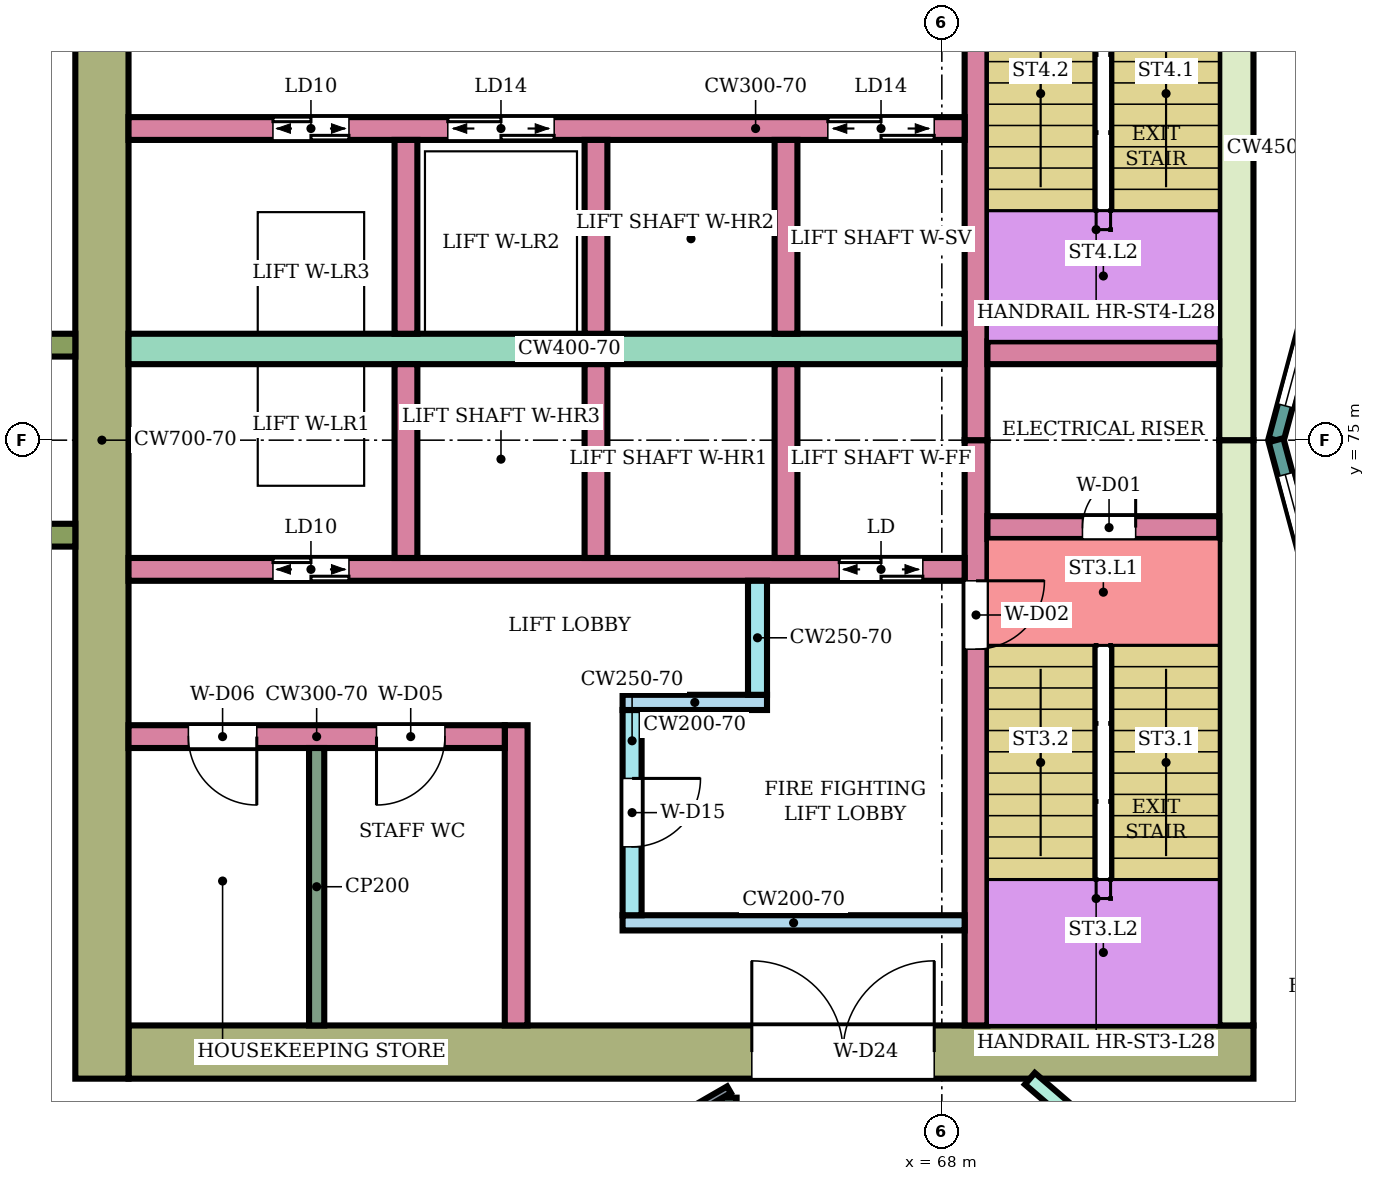
"""IFC4 building model, lengths in metres.
Left out: names, types, materials, properties, quantities, classifications, styles, units other than length and angle.
Written with IfcOpenShell. Run it as: python <this file> out.ifc"""

import sys

from ifc_helpers import new_model, si_unit, direction, frame, frame_2d, origin, place, context, subcontext, project, spatial, rectangle, extrude, element, fill, save


model = new_model("IFC4")
c1 = context("Model", 3, precision=1e-05, world=origin(), true_north=direction((0.0, 1.0)))
c2 = subcontext(c1, "Body", "Model", "MODEL_VIEW")
j1 = project(units=[si_unit("LENGTHUNIT", "METRE"), si_unit("PLANEANGLEUNIT", "RADIAN")], contexts=[c1])
p1 = place(None, origin())
s1 = spatial("IfcSite", under=j1, at=p1, CompositionType="ELEMENT")
p2 = place(p1, origin())
s2 = spatial("IfcBuilding", under=s1, at=p2, CompositionType="ELEMENT")
p3 = place(p2, frame((0.0, 0.0, 122.4)))
s3 = spatial("IfcBuildingStorey", under=s2, at=p3, CompositionType="ELEMENT", Elevation=122.4)
p4 = place(p3, frame((72.1, 66.95, 0.0), z_axis=(0.0, 0.0, 1.0), x_axis=(-1.0, 0.0, 0.0)))
e1 = element("IfcWall", 1, at=p4, inside=s3, PredefinedType="SHEAR", context=c2, shape_type="SweptSolid", body=[
    extrude(rectangle(XDim=14.8, YDim=0.7, at=frame_2d((7.4, 0.0))), origin(), (0.0, 0.0, 1.0), 3.58),
])
p5 = place(p4, frame((4.2, 0.0, 0.0)))
e2 = element("IfcOpeningElement", 2, at=p5, cuts=e1, PredefinedType="OPENING", context=c2, shape_type="SweptSolid", body=[
    extrude(rectangle(XDim=2.4, YDim=2.4, at=frame_2d((1.2, 1.2))), frame((0.0, 0.36, 0.0), z_axis=(0.0, -1.0, 0.0), x_axis=(1.0, 0.0, 0.0)), (0.0, 0.0, 1.0), 0.72),
])
for number, where, z_axis, x_axis in (
    (3, (71.875, 75.0, 0.0), (0.0, 0.0, 1.0), (0.0, -1.0, 0.0)),
    (4, (71.875, 82.7, 0.0), (0.0, 0.0, 1.0), (0.0, -1.0, 0.0)),
):
    element("IfcWall", number, at=place(p3, frame(where, z_axis=z_axis, x_axis=x_axis)), inside=s3, PredefinedType="SHEAR", context=c2, shape_type="SweptSolid", body=[
        extrude(rectangle(XDim=7.7, YDim=0.45, at=frame_2d((3.85, 0.0))), origin(), (0.0, 0.0, 1.0), 3.58),
    ])
p6 = place(p3, frame((56.95, 83.4, 0.0), z_axis=(0.0, 0.0, 1.0), x_axis=(0.0, -1.0, 0.0)))
e5 = element("IfcWall", 5, at=p6, inside=s3, PredefinedType="SHEAR", context=c2, shape_type="SweptSolid", body=[
    extrude(rectangle(XDim=16.8, YDim=0.7, at=frame_2d((8.4, 0.0))), origin(), (0.0, 0.0, 1.0), 3.58),
])
p7 = place(p3, frame((68.45, 75.0, 0.0), z_axis=(0.0, 0.0, 1.0), x_axis=(0.0, -1.0, 0.0)))
e6 = element("IfcWall", 6, at=p7, inside=s3, PredefinedType="SHEAR", context=c2, shape_type="SweptSolid", body=[
    extrude(rectangle(XDim=7.7, YDim=0.3, at=frame_2d((3.85, 0.0))), origin(), (0.0, 0.0, 1.0), 3.58),
])
p8 = place(p7, frame((1.85, 0.0, 0.0)))
e7 = element("IfcOpeningElement", 7, at=p8, cuts=e6, PredefinedType="OPENING", context=c2, shape_type="SweptSolid", body=[
    extrude(rectangle(XDim=0.9, YDim=2.1, at=frame_2d((0.45, 1.05))), frame((0.0, 0.16, 0.0), z_axis=(0.0, -1.0, 0.0), x_axis=(1.0, 0.0, 0.0)), (0.0, 0.0, 1.0), 0.32),
])
p9 = place(p3, frame((68.45, 82.7, 0.0), z_axis=(0.0, 0.0, 1.0), x_axis=(0.0, -1.0, 0.0)))
e8 = element("IfcWall", 8, at=p9, inside=s3, PredefinedType="SHEAR", context=c2, shape_type="SweptSolid", body=[
    extrude(rectangle(XDim=7.7, YDim=0.3, at=frame_2d((3.85, 0.0))), origin(), (0.0, 0.0, 1.0), 3.58),
])
p10 = place(p9, frame((0.35, 0.0, 0.0)))
e9 = element("IfcOpeningElement", 9, at=p10, cuts=e8, PredefinedType="OPENING", context=c2, shape_type="SweptSolid", body=[
    extrude(rectangle(XDim=0.9, YDim=2.1, at=frame_2d((0.45, 1.05))), frame((0.0, 0.16, 0.0), z_axis=(0.0, -1.0, 0.0), x_axis=(1.0, 0.0, 0.0)), (0.0, 0.0, 1.0), 0.32),
])
p11 = place(p3, frame((71.65, 73.85, 0.0), z_axis=(0.0, 0.0, 1.0), x_axis=(-1.0, 0.0, 0.0)))
e10 = element("IfcWall", 10, at=p11, inside=s3, PredefinedType="SHEAR", context=c2, shape_type="SweptSolid", body=[
    extrude(rectangle(XDim=3.05, YDim=0.3, at=frame_2d((1.525, 0.0))), origin(), (0.0, 0.0, 1.0), 3.58),
])
p12 = place(p11, frame((1.1, 0.0, 0.0)))
e11 = element("IfcOpeningElement", 11, at=p12, cuts=e10, PredefinedType="OPENING", context=c2, shape_type="SweptSolid", body=[
    extrude(rectangle(XDim=0.7, YDim=2.0, at=frame_2d((0.35, 1.0))), frame((0.0, 0.16, 0.0), z_axis=(0.0, -1.0, 0.0), x_axis=(1.0, 0.0, 0.0)), (0.0, 0.0, 1.0), 0.32),
])
p13 = place(p3, frame((71.65, 76.15, 0.0), z_axis=(0.0, 0.0, 1.0), x_axis=(-1.0, 0.0, 0.0)))
e12 = element("IfcWall", 12, at=p13, inside=s3, PredefinedType="SHEAR", context=c2, shape_type="SweptSolid", body=[
    extrude(rectangle(XDim=3.05, YDim=0.3, at=frame_2d((1.525, 0.0))), origin(), (0.0, 0.0, 1.0), 3.58),
])
p14 = place(p3, frame((68.3, 73.3, 0.0), z_axis=(0.0, 0.0, 1.0), x_axis=(-1.0, 0.0, 0.0)))
e13 = element("IfcWall", 13, at=p14, inside=s3, PredefinedType="SHEAR", context=c2, shape_type="SweptSolid", body=[
    extrude(rectangle(XDim=11.0, YDim=0.3, at=frame_2d((5.5, 0.0))), origin(), (0.0, 0.0, 1.0), 3.58),
])
p15 = place(p14, frame((0.55, 0.0, 0.0)))
e14 = element("IfcOpeningElement", 14, at=p15, cuts=e13, PredefinedType="OPENING", context=c2, shape_type="SweptSolid", body=[
    extrude(rectangle(XDim=1.1, YDim=2.1, at=frame_2d((0.55, 1.05))), frame((0.0, 0.16, 0.0), z_axis=(0.0, -1.0, 0.0), x_axis=(1.0, 0.0, 0.0)), (0.0, 0.0, 1.0), 0.32),
])
p16 = place(p14, frame((8.1, 0.0, 0.0)))
e15 = element("IfcOpeningElement", 15, at=p16, cuts=e13, PredefinedType="OPENING", context=c2, shape_type="SweptSolid", body=[
    extrude(rectangle(XDim=1.0, YDim=2.1, at=frame_2d((0.5, 1.05))), frame((0.0, 0.16, 0.0), z_axis=(0.0, -1.0, 0.0), x_axis=(1.0, 0.0, 0.0)), (0.0, 0.0, 1.0), 0.32),
])
p17 = place(p3, frame((68.3, 76.2, 0.0), z_axis=(0.0, 0.0, 1.0), x_axis=(-1.0, 0.0, 0.0)))
e16 = element("IfcWall", 16, at=p17, inside=s3, PredefinedType="SHEAR", context=c2, shape_type="SweptSolid", body=[
    extrude(rectangle(XDim=11.0, YDim=0.4, at=frame_2d((5.5, 0.0))), origin(), (0.0, 0.0, 1.0), 3.58),
])
p18 = place(p3, frame((68.3, 79.1, 0.0), z_axis=(0.0, 0.0, 1.0), x_axis=(-1.0, 0.0, 0.0)))
e17 = element("IfcWall", 17, at=p18, inside=s3, PredefinedType="SHEAR", context=c2, shape_type="SweptSolid", body=[
    extrude(rectangle(XDim=11.0, YDim=0.3, at=frame_2d((5.5, 0.0))), origin(), (0.0, 0.0, 1.0), 3.58),
])
p19 = place(p18, frame((0.4, 0.0, 0.0)))
e18 = element("IfcOpeningElement", 18, at=p19, cuts=e17, PredefinedType="OPENING", context=c2, shape_type="SweptSolid", body=[
    extrude(rectangle(XDim=1.4, YDim=2.1, at=frame_2d((0.7, 1.05))), frame((0.0, 0.16, 0.0), z_axis=(0.0, -1.0, 0.0), x_axis=(1.0, 0.0, 0.0)), (0.0, 0.0, 1.0), 0.32),
])
p20 = place(p18, frame((5.4, 0.0, 0.0)))
e19 = element("IfcOpeningElement", 19, at=p20, cuts=e17, PredefinedType="OPENING", context=c2, shape_type="SweptSolid", body=[
    extrude(rectangle(XDim=1.4, YDim=2.1, at=frame_2d((0.7, 1.05))), frame((0.0, 0.16, 0.0), z_axis=(0.0, -1.0, 0.0), x_axis=(1.0, 0.0, 0.0)), (0.0, 0.0, 1.0), 0.32),
])
p21 = place(p18, frame((8.1, 0.0, 0.0)))
e20 = element("IfcOpeningElement", 20, at=p21, cuts=e17, PredefinedType="OPENING", context=c2, shape_type="SweptSolid", body=[
    extrude(rectangle(XDim=1.0, YDim=2.1, at=frame_2d((0.5, 1.05))), frame((0.0, 0.16, 0.0), z_axis=(0.0, -1.0, 0.0), x_axis=(1.0, 0.0, 0.0)), (0.0, 0.0, 1.0), 0.32),
])
for number, where, z_axis, x_axis in (
    (21, (65.95, 76.0, 0.0), (0.0, 0.0, 1.0), (0.0, -1.0, 0.0)),
    (22, (63.45, 76.0, 0.0), (0.0, 0.0, 1.0), (0.0, -1.0, 0.0)),
    (23, (60.95, 76.0, 0.0), (0.0, 0.0, 1.0), (0.0, -1.0, 0.0)),
    (24, (65.95, 78.95, 0.0), (0.0, 0.0, 1.0), (0.0, -1.0, 0.0)),
    (25, (63.45, 78.95, 0.0), (0.0, 0.0, 1.0), (0.0, -1.0, 0.0)),
    (26, (60.95, 78.95, 0.0), (0.0, 0.0, 1.0), (0.0, -1.0, 0.0)),
):
    element("IfcWall", number, at=place(p3, frame(where, z_axis=z_axis, x_axis=x_axis)), inside=s3, PredefinedType="SHEAR", context=c2, shape_type="SweptSolid", body=[
        extrude(rectangle(XDim=2.55, YDim=0.3, at=frame_2d((1.275, 0.0))), origin(), (0.0, 0.0, 1.0), 3.58),
    ])
p22 = place(p3, frame((68.3, 68.65, 0.0), z_axis=(0.0, 0.0, 1.0), x_axis=(-1.0, 0.0, 0.0)))
e27 = element("IfcWall", 27, at=p22, inside=s3, PredefinedType="SHEAR", context=c2, shape_type="SweptSolid", body=[
    extrude(rectangle(XDim=4.5, YDim=0.2, at=frame_2d((2.25, 0.0))), origin(), (0.0, 0.0, 1.0), 3.58),
])
p23 = place(p3, frame((63.925, 71.45, 0.0), z_axis=(0.0, 0.0, 1.0), x_axis=(0.0, -1.0, 0.0)))
e28 = element("IfcWall", 28, at=p23, inside=s3, PredefinedType="SHEAR", context=c2, shape_type="SweptSolid", body=[
    extrude(rectangle(XDim=2.7, YDim=0.25, at=frame_2d((1.35, 0.0))), origin(), (0.0, 0.0, 1.0), 3.58),
])
p24 = place(p23, frame((0.9, 0.0, 0.0)))
e29 = element("IfcOpeningElement", 29, at=p24, cuts=e28, PredefinedType="OPENING", context=c2, shape_type="SweptSolid", body=[
    extrude(rectangle(XDim=0.9, YDim=2.1, at=frame_2d((0.45, 1.05))), frame((0.0, 0.135, 0.0), z_axis=(0.0, -1.0, 0.0), x_axis=(1.0, 0.0, 0.0)), (0.0, 0.0, 1.0), 0.27),
])
p25 = place(p3, frame((65.7, 71.55, 0.0), z_axis=(0.0, 0.0, 1.0), x_axis=(-1.0, 0.0, 0.0)))
e30 = element("IfcWall", 30, at=p25, inside=s3, PredefinedType="SHEAR", context=c2, shape_type="SweptSolid", body=[
    extrude(rectangle(XDim=1.9, YDim=0.2, at=frame_2d((0.95, 0.0))), origin(), (0.0, 0.0, 1.0), 3.58),
])
p26 = place(p3, frame((65.575, 73.15, 0.0), z_axis=(0.0, 0.0, 1.0), x_axis=(0.0, -1.0, 0.0)))
e31 = element("IfcWall", 31, at=p26, inside=s3, PredefinedType="SHEAR", context=c2, shape_type="SweptSolid", body=[
    extrude(rectangle(XDim=1.5, YDim=0.25, at=frame_2d((0.75, 0.0))), origin(), (0.0, 0.0, 1.0), 3.58),
])
p27 = place(p3, frame((62.4, 71.25, 0.0), z_axis=(0.0, 0.0, 1.0), x_axis=(0.0, -1.0, 0.0)))
e32 = element("IfcWall", 32, at=p27, inside=s3, PredefinedType="SHEAR", context=c2, shape_type="SweptSolid", body=[
    extrude(rectangle(XDim=3.95, YDim=0.3, at=frame_2d((1.975, 0.0))), origin(), (0.0, 0.0, 1.0), 3.58),
])
p28 = place(p3, frame((62.25, 71.1, 0.0), z_axis=(0.0, 0.0, 1.0), x_axis=(-1.0, 0.0, 0.0)))
e33 = element("IfcWall", 33, at=p28, inside=s3, PredefinedType="SHEAR", context=c2, shape_type="SweptSolid", body=[
    extrude(rectangle(XDim=4.95, YDim=0.3, at=frame_2d((2.475, 0.0))), origin(), (0.0, 0.0, 1.0), 3.58),
])
p29 = place(p28, frame((0.788, 0.0, 0.0)))
e34 = element("IfcOpeningElement", 34, at=p29, cuts=e33, PredefinedType="OPENING", context=c2, shape_type="SweptSolid", body=[
    extrude(rectangle(XDim=0.9, YDim=2.1, at=frame_2d((0.45, 1.05))), frame((0.0, 0.16, 0.0), z_axis=(0.0, -1.0, 0.0), x_axis=(1.0, 0.0, 0.0)), (0.0, 0.0, 1.0), 0.32),
])
p30 = place(p28, frame((3.262, 0.0, 0.0)))
e35 = element("IfcOpeningElement", 35, at=p30, cuts=e33, PredefinedType="OPENING", context=c2, shape_type="SweptSolid", body=[
    extrude(rectangle(XDim=0.9, YDim=2.1, at=frame_2d((0.45, 1.05))), frame((0.0, 0.16, 0.0), z_axis=(0.0, -1.0, 0.0), x_axis=(1.0, 0.0, 0.0)), (0.0, 0.0, 1.0), 0.32),
])
for number, where, z_axis, x_axis in (
    (36, (56.6, 76.25, 0.0), (0.0, 0.0, 1.0), (-1.0, 0.0, 0.0)),
    (37, (56.6, 73.75, 0.0), (0.0, 0.0, 1.0), (-1.0, 0.0, 0.0)),
):
    element("IfcWall", number, at=place(p3, frame(where, z_axis=z_axis, x_axis=x_axis)), inside=s3, PredefinedType="NOTDEFINED", context=c2, shape_type="SweptSolid", body=[
        extrude(rectangle(XDim=2.416, YDim=0.3, at=frame_2d((1.208, 0.0))), origin(), (0.0, 0.0, 1.0), 3.9),
    ])
p31 = place(p3, frame((73.415, 78.802, 0.0), z_axis=(0.0, 0.0, 1.0), x_axis=(-0.258789828301, -0.965933654434, 0.0)))
e38 = element("IfcWall", 38, at=p31, inside=s3, PredefinedType="NOTDEFINED", context=c2, shape_type="SweptSolid", body=[
    extrude(rectangle(XDim=3.936, YDim=0.2, at=frame_2d((1.968, 0.0))), origin(), (0.0, 0.0, 1.0), 3.9),
])
p32 = place(p31, frame((0.468, 0.0, 0.9)))
e39 = element("IfcOpeningElement", 39, at=p32, cuts=e38, PredefinedType="OPENING", context=c2, shape_type="SweptSolid", body=[
    extrude(rectangle(XDim=3.0, YDim=2.3, at=frame_2d((1.5, 1.15))), frame((0.0, 0.11, 0.0), z_axis=(0.0, -1.0, 0.0), x_axis=(1.0, 0.0, 0.0)), (0.0, 0.0, 1.0), 0.22),
])
p33 = place(p3, frame((72.396, 75.0, 0.0), z_axis=(0.0, 0.0, 1.0), x_axis=(0.258789828301, -0.965933654434, 0.0)))
e40 = element("IfcWall", 40, at=p33, inside=s3, PredefinedType="NOTDEFINED", context=c2, shape_type="SweptSolid", body=[
    extrude(rectangle(XDim=3.936, YDim=0.2, at=frame_2d((1.968, 0.0))), origin(), (0.0, 0.0, 1.0), 3.9),
])
p34 = place(p33, frame((0.468, 0.0, 0.9)))
e41 = element("IfcOpeningElement", 41, at=p34, cuts=e40, PredefinedType="OPENING", context=c2, shape_type="SweptSolid", body=[
    extrude(rectangle(XDim=3.0, YDim=2.3, at=frame_2d((1.5, 1.15))), frame((0.0, 0.11, 0.0), z_axis=(0.0, -1.0, 0.0), x_axis=(1.0, 0.0, 0.0)), (0.0, 0.0, 1.0), 0.22),
])
p35 = place(p3, frame((65.2, 65.2, 0.0), z_axis=(0.0, 0.0, 1.0), x_axis=(0.0, 1.0, 0.0)))
e42 = element("IfcWall", 42, at=p35, inside=s3, PredefinedType="PARTITIONING", context=c2, shape_type="SweptSolid", body=[
    extrude(rectangle(XDim=1.15, YDim=0.2, at=frame_2d((0.575, 0.0))), origin(), (0.0, 0.0, 1.0), 3.45),
])
p36 = place(p3, frame((69.158, 66.6, 0.0), z_axis=(0.0, 0.0, 1.0), x_axis=(0.758063092745, -0.652181222835, 0.0)))
e43 = element("IfcWall", 43, at=p36, inside=s3, PredefinedType="PARTITIONING", context=c2, shape_type="SweptSolid", body=[
    extrude(rectangle(XDim=5.16, YDim=0.2, at=frame_2d((2.58, 0.0))), origin(), (0.0, 0.0, 1.0), 3.45),
])
p37 = place(p36, frame((2.165, 0.0, 0.0)))
e44 = element("IfcOpeningElement", 44, at=p37, cuts=e43, PredefinedType="OPENING", context=c2, shape_type="SweptSolid", body=[
    extrude(rectangle(XDim=0.9, YDim=2.1, at=frame_2d((0.45, 1.05))), frame((0.0, 0.11, 0.0), z_axis=(0.0, -1.0, 0.0), x_axis=(1.0, 0.0, 0.0)), (0.0, 0.0, 1.0), 0.22),
])
p38 = place(p3, frame((57.659, 62.101, 0.0), z_axis=(0.0, 0.0, 1.0), x_axis=(0.86602264145, 0.500004784474, 0.0)))
e45 = element("IfcWall", 45, at=p38, inside=s3, PredefinedType="PARTITIONING", context=c2, shape_type="SweptSolid", body=[
    extrude(rectangle(XDim=8.708, YDim=0.1, at=frame_2d((4.354, 0.0))), origin(), (0.0, 0.0, 1.0), 3.45),
])
p39 = place(p38, frame((3.929, 0.0, 0.0)))
e46 = element("IfcOpeningElement", 46, at=p39, cuts=e45, PredefinedType="OPENING", context=c2, shape_type="SweptSolid", body=[
    extrude(rectangle(XDim=0.9, YDim=2.1, at=frame_2d((0.45, 1.05))), frame((0.0, 0.06, 0.0), z_axis=(0.0, -1.0, 0.0), x_axis=(1.0, 0.0, 0.0)), (0.0, 0.0, 1.0), 0.12),
])
p40 = place(p3, frame((59.775, 70.95, 0.0), z_axis=(0.0, 0.0, 1.0), x_axis=(0.0, -1.0, 0.0)))
e47 = element("IfcWall", 47, at=p40, inside=s3, PredefinedType="PARTITIONING", context=c2, shape_type="SweptSolid", body=[
    extrude(rectangle(XDim=3.65, YDim=0.2, at=frame_2d((1.825, 0.0))), origin(), (0.0, 0.0, 1.0), 3.58),
])
p41 = place(p32, origin())
e48 = element("IfcWindow", 48, at=p41, inside=s3, PartitioningType="SINGLE_PANEL", PredefinedType="WINDOW", context=c2, shape_type="SweptSolid", body=[
    extrude(rectangle(XDim=3.0, YDim=2.3, at=frame_2d((1.5, 1.15))), frame((0.0, 0.03, 0.0), z_axis=(0.0, -1.0, 0.0), x_axis=(1.0, 0.0, 0.0)), (0.0, 0.0, 1.0), 0.06),
])
fill(e39, e48)
p42 = place(p34, origin())
e49 = element("IfcWindow", 49, at=p42, inside=s3, PartitioningType="SINGLE_PANEL", PredefinedType="WINDOW", context=c2, shape_type="SweptSolid", body=[
    extrude(rectangle(XDim=3.0, YDim=2.3, at=frame_2d((1.5, 1.15))), frame((0.0, 0.03, 0.0), z_axis=(0.0, -1.0, 0.0), x_axis=(1.0, 0.0, 0.0)), (0.0, 0.0, 1.0), 0.06),
])
fill(e41, e49)
p43 = place(p12, frame((0.7, 0.0, 0.0), z_axis=(0.0, 0.0, 1.0), x_axis=(-1.0, 0.0, 0.0)))
e50 = element("IfcDoor", 50, at=p43, inside=s3, OperationType="SINGLE_SWING_RIGHT", PredefinedType="DOOR", context=c2, shape_type="SweptSolid", body=[
    extrude(rectangle(XDim=0.7, YDim=2.0, at=frame_2d((0.35, 1.0))), frame((0.0, 0.025, 0.0), z_axis=(0.0, -1.0, 0.0), x_axis=(1.0, 0.0, 0.0)), (0.0, 0.0, 1.0), 0.05),
])
fill(e11, e50)
p44 = place(p8, origin())
e51 = element("IfcDoor", 51, at=p44, inside=s3, OperationType="SINGLE_SWING_LEFT", PredefinedType="DOOR", context=c2, shape_type="SweptSolid", body=[
    extrude(rectangle(XDim=0.9, YDim=2.1, at=frame_2d((0.45, 1.05))), frame((0.0, 0.025, 0.0), z_axis=(0.0, -1.0, 0.0), x_axis=(1.0, 0.0, 0.0)), (0.0, 0.0, 1.0), 0.05),
])
fill(e7, e51)
p45 = place(p15, origin())
e52 = element("IfcDoor", 52, at=p45, inside=s3, OperationType="DOUBLE_DOOR_SLIDING", PredefinedType="DOOR", context=c2, shape_type="SweptSolid", body=[
    extrude(rectangle(XDim=1.1, YDim=2.1, at=frame_2d((0.55, 1.05))), frame((0.0, 0.025, 0.0), z_axis=(0.0, -1.0, 0.0), x_axis=(1.0, 0.0, 0.0)), (0.0, 0.0, 1.0), 0.05),
])
fill(e14, e52)
p46 = place(p16, origin())
e53 = element("IfcDoor", 53, at=p46, inside=s3, OperationType="DOUBLE_DOOR_SLIDING", PredefinedType="DOOR", context=c2, shape_type="SweptSolid", body=[
    extrude(rectangle(XDim=1.0, YDim=2.1, at=frame_2d((0.5, 1.05))), frame((0.0, 0.025, 0.0), z_axis=(0.0, -1.0, 0.0), x_axis=(1.0, 0.0, 0.0)), (0.0, 0.0, 1.0), 0.05),
])
fill(e15, e53)
p47 = place(p19, origin())
e54 = element("IfcDoor", 54, at=p47, inside=s3, OperationType="DOUBLE_DOOR_SLIDING", PredefinedType="DOOR", context=c2, shape_type="SweptSolid", body=[
    extrude(rectangle(XDim=1.4, YDim=2.1, at=frame_2d((0.7, 1.05))), frame((0.0, 0.025, 0.0), z_axis=(0.0, -1.0, 0.0), x_axis=(1.0, 0.0, 0.0)), (0.0, 0.0, 1.0), 0.05),
])
fill(e18, e54)
p48 = place(p20, origin())
e55 = element("IfcDoor", 55, at=p48, inside=s3, OperationType="DOUBLE_DOOR_SLIDING", PredefinedType="DOOR", context=c2, shape_type="SweptSolid", body=[
    extrude(rectangle(XDim=1.4, YDim=2.1, at=frame_2d((0.7, 1.05))), frame((0.0, 0.025, 0.0), z_axis=(0.0, -1.0, 0.0), x_axis=(1.0, 0.0, 0.0)), (0.0, 0.0, 1.0), 0.05),
])
fill(e19, e55)
p49 = place(p21, origin())
e56 = element("IfcDoor", 56, at=p49, inside=s3, OperationType="DOUBLE_DOOR_SLIDING", PredefinedType="DOOR", context=c2, shape_type="SweptSolid", body=[
    extrude(rectangle(XDim=1.0, YDim=2.1, at=frame_2d((0.5, 1.05))), frame((0.0, 0.025, 0.0), z_axis=(0.0, -1.0, 0.0), x_axis=(1.0, 0.0, 0.0)), (0.0, 0.0, 1.0), 0.05),
])
fill(e20, e56)
p50 = place(p24, origin())
e57 = element("IfcDoor", 57, at=p50, inside=s3, OperationType="SINGLE_SWING_LEFT", PredefinedType="DOOR", context=c2, shape_type="SweptSolid", body=[
    extrude(rectangle(XDim=0.9, YDim=2.1, at=frame_2d((0.45, 1.05))), frame((0.0, 0.025, 0.0), z_axis=(0.0, -1.0, 0.0), x_axis=(1.0, 0.0, 0.0)), (0.0, 0.0, 1.0), 0.05),
])
fill(e29, e57)
p51 = place(p29, origin())
e58 = element("IfcDoor", 58, at=p51, inside=s3, OperationType="SINGLE_SWING_RIGHT", PredefinedType="DOOR", context=c2, shape_type="SweptSolid", body=[
    extrude(rectangle(XDim=0.9, YDim=2.1, at=frame_2d((0.45, 1.05))), frame((0.0, 0.025, 0.0), z_axis=(0.0, -1.0, 0.0), x_axis=(1.0, 0.0, 0.0)), (0.0, 0.0, 1.0), 0.05),
])
fill(e34, e58)
p52 = place(p30, origin())
e59 = element("IfcDoor", 59, at=p52, inside=s3, OperationType="SINGLE_SWING_LEFT", PredefinedType="DOOR", context=c2, shape_type="SweptSolid", body=[
    extrude(rectangle(XDim=0.9, YDim=2.1, at=frame_2d((0.45, 1.05))), frame((0.0, 0.025, 0.0), z_axis=(0.0, -1.0, 0.0), x_axis=(1.0, 0.0, 0.0)), (0.0, 0.0, 1.0), 0.05),
])
fill(e35, e59)
p53 = place(p5, frame((2.4, 0.0, 0.0), z_axis=(0.0, 0.0, 1.0), x_axis=(-1.0, 0.0, 0.0)))
e60 = element("IfcDoor", 60, at=p53, inside=s3, OperationType="DOUBLE_DOOR_SINGLE_SWING", PredefinedType="DOOR", context=c2, shape_type="SweptSolid", body=[
    extrude(rectangle(XDim=2.4, YDim=2.4, at=frame_2d((1.2, 1.2))), frame((0.0, 0.025, 0.0), z_axis=(0.0, -1.0, 0.0), x_axis=(1.0, 0.0, 0.0)), (0.0, 0.0, 1.0), 0.05),
])
fill(e2, e60)
save(model, sys.argv[1])
